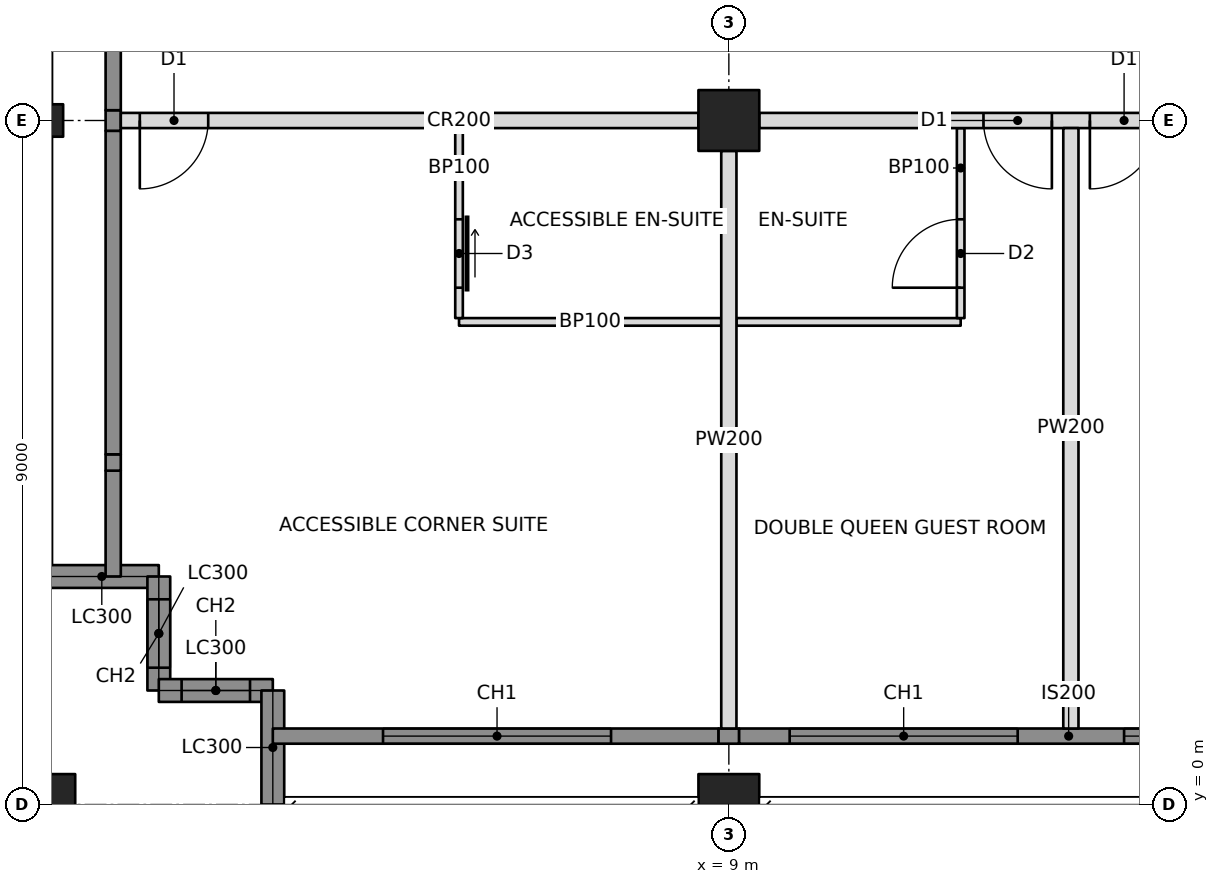
"""IFC4 building model, lengths in metres.
Left out: names, types, materials, properties, quantities, classifications, styles, units other than length and angle.
Written with IfcOpenShell. Run it as: python <this file> out.ifc"""

import sys

from ifc_helpers import new_model, si_unit, direction, frame, frame_2d, origin, origin_with_axes, origin_2d, place, context, subcontext, project, spatial, rectangle, hollow_rectangle, i_section, extrude, element, fill, save


model = new_model("IFC4")
c1 = context("Model", 3, precision=1e-05, world=origin(), true_north=direction((0.0, 1.0)))
c2 = subcontext(c1, "Body", "Model", "MODEL_VIEW")
j1 = project(units=[si_unit("LENGTHUNIT", "METRE"), si_unit("PLANEANGLEUNIT", "RADIAN")], contexts=[c1])
p1 = place(None, origin())
s1 = spatial("IfcSite", under=j1, at=p1, CompositionType="ELEMENT")
p2 = place(p1, origin())
s2 = spatial("IfcBuilding", under=s1, at=p2, CompositionType="ELEMENT")
p3 = place(p2, frame((0.0, 0.0, 204.6)))
s3 = spatial("IfcBuildingStorey", under=s2, at=p3, CompositionType="ELEMENT", Elevation=204.6)
p4 = place(p3, origin_with_axes())
e1 = element("IfcColumn", 1, at=p4, inside=s3, PredefinedType="COLUMN", context=c2, shape_type="SweptSolid", body=[
    extrude(hollow_rectangle(XDim=0.8, YDim=0.8, WallThickness=0.06, at=origin_2d()), origin(), (0.0, 0.0, 1.0), 3.4),
])
p5 = place(p3, frame((0.0, 9.0, 0.0), z_axis=(0.0, 0.0, 1.0), x_axis=(0.0, 1.0, 0.0)))
e2 = element("IfcColumn", 2, at=p5, inside=s3, PredefinedType="COLUMN", context=c2, shape_type="SweptSolid", body=[
    extrude(i_section(OverallWidth=0.427, OverallDepth=0.483, WebThickness=0.051, FlangeThickness=0.082, at=origin_2d()), origin(), (0.0, 0.0, 1.0), 3.4),
])
p6 = place(p3, frame((9.0, 0.0, 0.0), z_axis=(0.0, 0.0, 1.0), x_axis=(1.0, 0.0, 0.0)))
e3 = element("IfcColumn", 3, at=p6, inside=s3, PredefinedType="COLUMN", context=c2, shape_type="SweptSolid", body=[
    extrude(hollow_rectangle(XDim=0.8, YDim=0.8, WallThickness=0.06, at=origin_2d()), origin(), (0.0, 0.0, 1.0), 3.4),
])
p7 = place(p3, frame((9.0, 9.0, 0.0), z_axis=(0.0, 0.0, 1.0), x_axis=(1.0, 0.0, 0.0)))
e4 = element("IfcColumn", 4, at=p7, inside=s3, PredefinedType="COLUMN", context=c2, shape_type="SweptSolid", body=[
    extrude(hollow_rectangle(XDim=0.8, YDim=0.8, WallThickness=0.05, at=origin_2d()), origin(), (0.0, 0.0, 1.0), 3.4),
])
p8 = place(p3, frame((0.0, 3.0, 0.0), z_axis=(0.0, 0.0, 1.0), x_axis=(1.0, 0.0, 0.0)))
e5 = element("IfcWall", 5, at=p8, inside=s3, PredefinedType="SOLIDWALL", context=c2, shape_type="SweptSolid", body=[
    extrude(rectangle(XDim=1.5, YDim=0.3, at=frame_2d((0.75, 0.0))), origin(), (0.0, 0.0, 1.0), 2.42),
])
p9 = place(p3, frame((1.5, 3.0, 0.0), z_axis=(0.0, 0.0, 1.0), x_axis=(0.0, -1.0, 0.0)))
e6 = element("IfcWall", 6, at=p9, inside=s3, PredefinedType="SOLIDWALL", context=c2, shape_type="SweptSolid", body=[
    extrude(rectangle(XDim=1.5, YDim=0.3, at=frame_2d((0.75, 0.0))), origin(), (0.0, 0.0, 1.0), 3.2),
])
p10 = place(p9, frame((0.3, 0.0, 0.6)))
e7 = element("IfcOpeningElement", 7, at=p10, cuts=e6, PredefinedType="OPENING", context=c2, shape_type="SweptSolid", body=[
    extrude(rectangle(XDim=0.9, YDim=2.2, at=frame_2d((0.45, 1.1))), frame((0.0, 0.16, 0.0), z_axis=(0.0, -1.0, 0.0), x_axis=(1.0, 0.0, 0.0)), (0.0, 0.0, 1.0), 0.32),
])
p11 = place(p3, frame((1.5, 1.5, 0.0), z_axis=(0.0, 0.0, 1.0), x_axis=(1.0, 0.0, 0.0)))
e8 = element("IfcWall", 8, at=p11, inside=s3, PredefinedType="SOLIDWALL", context=c2, shape_type="SweptSolid", body=[
    extrude(rectangle(XDim=1.5, YDim=0.3, at=frame_2d((0.75, 0.0))), origin(), (0.0, 0.0, 1.0), 3.2),
])
p12 = place(p11, frame((0.3, 0.0, 0.6)))
e9 = element("IfcOpeningElement", 9, at=p12, cuts=e8, PredefinedType="OPENING", context=c2, shape_type="SweptSolid", body=[
    extrude(rectangle(XDim=0.9, YDim=2.2, at=frame_2d((0.45, 1.1))), frame((0.0, 0.16, 0.0), z_axis=(0.0, -1.0, 0.0), x_axis=(1.0, 0.0, 0.0)), (0.0, 0.0, 1.0), 0.32),
])
p13 = place(p3, frame((3.0, 1.5, 0.0), z_axis=(0.0, 0.0, 1.0), x_axis=(0.0, -1.0, 0.0)))
e10 = element("IfcWall", 10, at=p13, inside=s3, PredefinedType="SOLIDWALL", context=c2, shape_type="SweptSolid", body=[
    extrude(rectangle(XDim=1.5, YDim=0.3, at=frame_2d((0.75, 0.0))), origin(), (0.0, 0.0, 1.0), 2.42),
])
p14 = place(p3, frame((3.0, 0.9, 0.0), z_axis=(0.0, 0.0, 1.0), x_axis=(1.0, 0.0, 0.0)))
e11 = element("IfcWall", 11, at=p14, inside=s3, PredefinedType="SOLIDWALL", context=c2, shape_type="SweptSolid", body=[
    extrude(rectangle(XDim=5.865, YDim=0.2, at=frame_2d((2.932, 0.0))), origin(), (0.0, 0.0, 1.0), 3.2),
])
p15 = place(p14, frame((1.45, 0.0, 0.6)))
e12 = element("IfcOpeningElement", 12, at=p15, cuts=e11, PredefinedType="OPENING", context=c2, shape_type="SweptSolid", body=[
    extrude(rectangle(XDim=3.0, YDim=2.2, at=frame_2d((1.5, 1.1))), frame((0.0, 0.11, 0.0), z_axis=(0.0, -1.0, 0.0), x_axis=(1.0, 0.0, 0.0)), (0.0, 0.0, 1.0), 0.22),
])
p16 = place(p3, frame((0.9, 3.0, 0.0), z_axis=(0.0, 0.0, 1.0), x_axis=(0.0, 1.0, 0.0)))
e13 = element("IfcWall", 13, at=p16, inside=s3, PredefinedType="SOLIDWALL", context=c2, shape_type="SweptSolid", body=[
    extrude(rectangle(XDim=1.393, YDim=0.2, at=frame_2d((0.696, 0.0))), origin(), (0.0, 0.0, 1.0), 3.2),
])
p17 = place(p3, frame((1.0, 9.0, 0.0), z_axis=(0.0, 0.0, 1.0), x_axis=(1.0, 0.0, 0.0)))
e14 = element("IfcWall", 14, at=p17, inside=s3, PredefinedType="PARTITIONING", context=c2, shape_type="SweptSolid", body=[
    extrude(rectangle(XDim=7.6, YDim=0.2, at=frame_2d((3.8, 0.0))), origin(), (0.0, 0.0, 1.0), 2.438),
])
p18 = place(p17, frame((0.25, 0.0, 0.0)))
e15 = element("IfcOpeningElement", 15, at=p18, cuts=e14, PredefinedType="OPENING", context=c2, shape_type="SweptSolid", body=[
    extrude(rectangle(XDim=0.9, YDim=2.1, at=frame_2d((0.45, 1.05))), frame((0.0, 0.11, 0.0), z_axis=(0.0, -1.0, 0.0), x_axis=(1.0, 0.0, 0.0)), (0.0, 0.0, 1.0), 0.22),
])
p19 = place(p3, frame((9.4, 9.0, 0.0), z_axis=(0.0, 0.0, 1.0), x_axis=(1.0, 0.0, 0.0)))
e16 = element("IfcWall", 16, at=p19, inside=s3, PredefinedType="PARTITIONING", context=c2, shape_type="SweptSolid", body=[
    extrude(rectangle(XDim=8.2, YDim=0.2, at=frame_2d((4.1, 0.0))), origin(), (0.0, 0.0, 1.0), 2.405),
])
p20 = place(p19, frame((2.95, 0.0, 0.0)))
e17 = element("IfcOpeningElement", 17, at=p20, cuts=e16, PredefinedType="OPENING", context=c2, shape_type="SweptSolid", body=[
    extrude(rectangle(XDim=0.9, YDim=2.1, at=frame_2d((0.45, 1.05))), frame((0.0, 0.11, 0.0), z_axis=(0.0, -1.0, 0.0), x_axis=(1.0, 0.0, 0.0)), (0.0, 0.0, 1.0), 0.22),
])
p21 = place(p19, frame((4.35, 0.0, 0.0)))
e18 = element("IfcOpeningElement", 18, at=p21, cuts=e16, PredefinedType="OPENING", context=c2, shape_type="SweptSolid", body=[
    extrude(rectangle(XDim=0.9, YDim=2.1, at=frame_2d((0.45, 1.05))), frame((0.0, 0.11, 0.0), z_axis=(0.0, -1.0, 0.0), x_axis=(1.0, 0.0, 0.0)), (0.0, 0.0, 1.0), 0.22),
])
p22 = place(p3, frame((9.0, 8.6, 0.0), z_axis=(0.0, 0.0, 1.0), x_axis=(0.0, -1.0, 0.0)))
e19 = element("IfcWall", 19, at=p22, inside=s3, PredefinedType="PARTITIONING", context=c2, shape_type="SweptSolid", body=[
    extrude(rectangle(XDim=7.6, YDim=0.2, at=frame_2d((3.8, 0.0))), origin(), (0.0, 0.0, 1.0), 2.438),
])
p23 = place(p3, frame((13.5, 8.9, 0.0), z_axis=(0.0, 0.0, 1.0), x_axis=(0.0, -1.0, 0.0)))
e20 = element("IfcWall", 20, at=p23, inside=s3, PredefinedType="PARTITIONING", context=c2, shape_type="SweptSolid", body=[
    extrude(rectangle(XDim=7.9, YDim=0.2, at=frame_2d((3.95, 0.0))), origin(), (0.0, 0.0, 1.0), 2.404),
])
p24 = place(p3, frame((5.45, 6.35, 0.0), z_axis=(0.0, 0.0, 1.0), x_axis=(1.0, 0.0, 0.0)))
e21 = element("IfcWall", 21, at=p24, inside=s3, PredefinedType="PARTITIONING", context=c2, shape_type="SweptSolid", body=[
    extrude(rectangle(XDim=3.45, YDim=0.1, at=frame_2d((1.725, 0.0))), origin(), (0.0, 0.0, 1.0), 2.438),
])
p25 = place(p3, frame((5.45, 8.9, 0.0), z_axis=(0.0, 0.0, 1.0), x_axis=(0.0, -1.0, 0.0)))
e22 = element("IfcWall", 22, at=p25, inside=s3, PredefinedType="PARTITIONING", context=c2, shape_type="SweptSolid", body=[
    extrude(rectangle(XDim=2.5, YDim=0.1, at=frame_2d((1.25, 0.0))), origin(), (0.0, 0.0, 1.0), 2.438),
])
p26 = place(p25, frame((1.2, 0.0, 0.0)))
e23 = element("IfcOpeningElement", 23, at=p26, cuts=e22, PredefinedType="OPENING", context=c2, shape_type="SweptSolid", body=[
    extrude(rectangle(XDim=0.9, YDim=2.1, at=frame_2d((0.45, 1.05))), frame((0.0, 0.06, 0.0), z_axis=(0.0, -1.0, 0.0), x_axis=(1.0, 0.0, 0.0)), (0.0, 0.0, 1.0), 0.12),
])
p27 = place(p3, frame((9.1, 6.35, 0.0), z_axis=(0.0, 0.0, 1.0), x_axis=(1.0, 0.0, 0.0)))
e24 = element("IfcWall", 24, at=p27, inside=s3, PredefinedType="PARTITIONING", context=c2, shape_type="SweptSolid", body=[
    extrude(rectangle(XDim=2.95, YDim=0.1, at=frame_2d((1.475, 0.0))), origin(), (0.0, 0.0, 1.0), 2.438),
])
p28 = place(p3, frame((12.05, 8.9, 0.0), z_axis=(0.0, 0.0, 1.0), x_axis=(0.0, -1.0, 0.0)))
e25 = element("IfcWall", 25, at=p28, inside=s3, PredefinedType="PARTITIONING", context=c2, shape_type="SweptSolid", body=[
    extrude(rectangle(XDim=2.5, YDim=0.1, at=frame_2d((1.25, 0.0))), origin(), (0.0, 0.0, 1.0), 2.404),
])
p29 = place(p28, frame((1.2, 0.0, 0.0)))
e26 = element("IfcOpeningElement", 26, at=p29, cuts=e25, PredefinedType="OPENING", context=c2, shape_type="SweptSolid", body=[
    extrude(rectangle(XDim=0.9, YDim=2.1, at=frame_2d((0.45, 1.05))), frame((0.0, 0.06, 0.0), z_axis=(0.0, -1.0, 0.0), x_axis=(1.0, 0.0, 0.0)), (0.0, 0.0, 1.0), 0.12),
])
p30 = place(p3, frame((8.865, 0.9, 0.0), z_axis=(0.0, 0.0, 1.0), x_axis=(1.0, 0.0, 0.0)))
e27 = element("IfcWall", 27, at=p30, inside=s3, PredefinedType="SOLIDWALL", context=c2, shape_type="SweptSolid", body=[
    extrude(rectangle(XDim=0.271, YDim=0.2, at=frame_2d((0.135, 0.0))), origin(), (0.0, 0.0, 1.0), 2.438),
])
p31 = place(p3, frame((9.135, 0.9, 0.0), z_axis=(0.0, 0.0, 1.0), x_axis=(1.0, 0.0, 0.0)))
e28 = element("IfcWall", 28, at=p31, inside=s3, PredefinedType="SOLIDWALL", context=c2, shape_type="SweptSolid", body=[
    extrude(rectangle(XDim=8.671, YDim=0.2, at=frame_2d((4.335, 0.0))), origin(), (0.0, 0.0, 1.0), 3.2),
])
p32 = place(p31, frame((0.665, 0.0, 0.6)))
e29 = element("IfcOpeningElement", 29, at=p32, cuts=e28, PredefinedType="OPENING", context=c2, shape_type="SweptSolid", body=[
    extrude(rectangle(XDim=3.0, YDim=2.2, at=frame_2d((1.5, 1.1))), frame((0.0, 0.11, 0.0), z_axis=(0.0, -1.0, 0.0), x_axis=(1.0, 0.0, 0.0)), (0.0, 0.0, 1.0), 0.22),
])
p33 = place(p31, frame((5.065, 0.0, 0.6)))
e30 = element("IfcOpeningElement", 30, at=p33, cuts=e28, PredefinedType="OPENING", context=c2, shape_type="SweptSolid", body=[
    extrude(rectangle(XDim=3.0, YDim=2.2, at=frame_2d((1.5, 1.1))), frame((0.0, 0.11, 0.0), z_axis=(0.0, -1.0, 0.0), x_axis=(1.0, 0.0, 0.0)), (0.0, 0.0, 1.0), 0.22),
])
p34 = place(p3, frame((0.9, 4.393, 0.0), z_axis=(0.0, 0.0, 1.0), x_axis=(0.0, 1.0, 0.0)))
e31 = element("IfcWall", 31, at=p34, inside=s3, PredefinedType="SOLIDWALL", context=c2, shape_type="SweptSolid", body=[
    extrude(rectangle(XDim=0.215, YDim=0.2, at=frame_2d((0.107, 0.0))), origin(), (0.0, 0.0, 1.0), 2.661),
])
p35 = place(p3, frame((0.9, 4.607, 0.0), z_axis=(0.0, 0.0, 1.0), x_axis=(0.0, 1.0, 0.0)))
e32 = element("IfcWall", 32, at=p35, inside=s3, PredefinedType="SOLIDWALL", context=c2, shape_type="SweptSolid", body=[
    extrude(rectangle(XDim=4.257, YDim=0.2, at=frame_2d((2.129, 0.0))), origin(), (0.0, 0.0, 1.0), 3.2),
])
p36 = place(p3, frame((0.9, 8.865, 0.0), z_axis=(0.0, 0.0, 1.0), x_axis=(0.0, 1.0, 0.0)))
e33 = element("IfcWall", 33, at=p36, inside=s3, PredefinedType="SOLIDWALL", context=c2, shape_type="SweptSolid", body=[
    extrude(rectangle(XDim=0.271, YDim=0.2, at=frame_2d((0.135, 0.0))), origin(), (0.0, 0.0, 1.0), 2.438),
])
p37 = place(p3, frame((0.9, 9.135, 0.0), z_axis=(0.0, 0.0, 1.0), x_axis=(0.0, 1.0, 0.0)))
e34 = element("IfcWall", 34, at=p37, inside=s3, PredefinedType="SOLIDWALL", context=c2, shape_type="SweptSolid", body=[
    extrude(rectangle(XDim=8.671, YDim=0.2, at=frame_2d((4.335, 0.0))), origin(), (0.0, 0.0, 1.0), 3.2),
])
p38 = place(p37, frame((2.015, 0.0, 0.6)))
e35 = element("IfcOpeningElement", 35, at=p38, cuts=e34, PredefinedType="OPENING", context=c2, shape_type="SweptSolid", body=[
    extrude(rectangle(XDim=3.0, YDim=2.2, at=frame_2d((1.5, 1.1))), frame((0.0, 0.11, 0.0), z_axis=(0.0, -1.0, 0.0), x_axis=(1.0, 0.0, 0.0)), (0.0, 0.0, 1.0), 0.22),
])
p39 = place(p37, frame((5.515, 0.0, 0.6)))
e36 = element("IfcOpeningElement", 36, at=p39, cuts=e34, PredefinedType="OPENING", context=c2, shape_type="SweptSolid", body=[
    extrude(rectangle(XDim=3.0, YDim=2.2, at=frame_2d((1.5, 1.1))), frame((0.0, 0.11, 0.0), z_axis=(0.0, -1.0, 0.0), x_axis=(1.0, 0.0, 0.0)), (0.0, 0.0, 1.0), 0.22),
])
p40 = place(p10, origin())
e37 = element("IfcWindow", 37, at=p40, inside=s3, PartitioningType="SINGLE_PANEL", PredefinedType="WINDOW", context=c2, shape_type="SweptSolid", body=[
    extrude(rectangle(XDim=0.9, YDim=2.2, at=frame_2d((0.45, 1.1))), frame((0.0, 0.03, 0.0), z_axis=(0.0, -1.0, 0.0), x_axis=(1.0, 0.0, 0.0)), (0.0, 0.0, 1.0), 0.06),
])
fill(e7, e37)
p41 = place(p12, origin())
e38 = element("IfcWindow", 38, at=p41, inside=s3, PartitioningType="SINGLE_PANEL", PredefinedType="WINDOW", context=c2, shape_type="SweptSolid", body=[
    extrude(rectangle(XDim=0.9, YDim=2.2, at=frame_2d((0.45, 1.1))), frame((0.0, 0.03, 0.0), z_axis=(0.0, -1.0, 0.0), x_axis=(1.0, 0.0, 0.0)), (0.0, 0.0, 1.0), 0.06),
])
fill(e9, e38)
p42 = place(p15, origin())
e39 = element("IfcWindow", 39, at=p42, inside=s3, PartitioningType="TRIPLE_PANEL_VERTICAL", PredefinedType="WINDOW", context=c2, shape_type="SweptSolid", body=[
    extrude(rectangle(XDim=3.0, YDim=2.2, at=frame_2d((1.5, 1.1))), frame((0.0, 0.03, 0.0), z_axis=(0.0, -1.0, 0.0), x_axis=(1.0, 0.0, 0.0)), (0.0, 0.0, 1.0), 0.06),
])
fill(e12, e39)
p43 = place(p32, origin())
e40 = element("IfcWindow", 40, at=p43, inside=s3, PartitioningType="TRIPLE_PANEL_VERTICAL", PredefinedType="WINDOW", context=c2, shape_type="SweptSolid", body=[
    extrude(rectangle(XDim=3.0, YDim=2.2, at=frame_2d((1.5, 1.1))), frame((0.0, 0.03, 0.0), z_axis=(0.0, -1.0, 0.0), x_axis=(1.0, 0.0, 0.0)), (0.0, 0.0, 1.0), 0.06),
])
fill(e29, e40)
p44 = place(p33, origin())
e41 = element("IfcWindow", 41, at=p44, inside=s3, PartitioningType="TRIPLE_PANEL_VERTICAL", PredefinedType="WINDOW", context=c2, shape_type="SweptSolid", body=[
    extrude(rectangle(XDim=3.0, YDim=2.2, at=frame_2d((1.5, 1.1))), frame((0.0, 0.03, 0.0), z_axis=(0.0, -1.0, 0.0), x_axis=(1.0, 0.0, 0.0)), (0.0, 0.0, 1.0), 0.06),
])
fill(e30, e41)
p45 = place(p26, origin())
e42 = element("IfcDoor", 42, at=p45, inside=s3, OperationType="SLIDING_TO_LEFT", PredefinedType="DOOR", context=c2, shape_type="SweptSolid", body=[
    extrude(rectangle(XDim=0.9, YDim=2.1, at=frame_2d((0.45, 1.05))), frame((0.0, 0.025, 0.0), z_axis=(0.0, -1.0, 0.0), x_axis=(1.0, 0.0, 0.0)), (0.0, 0.0, 1.0), 0.05),
])
fill(e23, e42)
p46 = place(p18, frame((0.9, 0.0, 0.0), z_axis=(0.0, 0.0, 1.0), x_axis=(-1.0, 0.0, 0.0)))
e43 = element("IfcDoor", 43, at=p46, inside=s3, OperationType="SINGLE_SWING_RIGHT", PredefinedType="DOOR", context=c2, shape_type="SweptSolid", body=[
    extrude(rectangle(XDim=0.9, YDim=2.1, at=frame_2d((0.45, 1.05))), frame((0.0, 0.025, 0.0), z_axis=(0.0, -1.0, 0.0), x_axis=(1.0, 0.0, 0.0)), (0.0, 0.0, 1.0), 0.05),
])
fill(e15, e43)
p47 = place(p29, frame((0.9, 0.0, 0.0), z_axis=(0.0, 0.0, 1.0), x_axis=(-1.0, 0.0, 0.0)))
e44 = element("IfcDoor", 44, at=p47, inside=s3, OperationType="SINGLE_SWING_LEFT", PredefinedType="DOOR", context=c2, shape_type="SweptSolid", body=[
    extrude(rectangle(XDim=0.9, YDim=2.1, at=frame_2d((0.45, 1.05))), frame((0.0, 0.025, 0.0), z_axis=(0.0, -1.0, 0.0), x_axis=(1.0, 0.0, 0.0)), (0.0, 0.0, 1.0), 0.05),
])
fill(e26, e44)
p48 = place(p20, frame((0.9, 0.0, 0.0), z_axis=(0.0, 0.0, 1.0), x_axis=(-1.0, 0.0, 0.0)))
e45 = element("IfcDoor", 45, at=p48, inside=s3, OperationType="SINGLE_SWING_LEFT", PredefinedType="DOOR", context=c2, shape_type="SweptSolid", body=[
    extrude(rectangle(XDim=0.9, YDim=2.1, at=frame_2d((0.45, 1.05))), frame((0.0, 0.025, 0.0), z_axis=(0.0, -1.0, 0.0), x_axis=(1.0, 0.0, 0.0)), (0.0, 0.0, 1.0), 0.05),
])
fill(e17, e45)
p49 = place(p21, frame((0.9, 0.0, 0.0), z_axis=(0.0, 0.0, 1.0), x_axis=(-1.0, 0.0, 0.0)))
e46 = element("IfcDoor", 46, at=p49, inside=s3, OperationType="SINGLE_SWING_RIGHT", PredefinedType="DOOR", context=c2, shape_type="SweptSolid", body=[
    extrude(rectangle(XDim=0.9, YDim=2.1, at=frame_2d((0.45, 1.05))), frame((0.0, 0.025, 0.0), z_axis=(0.0, -1.0, 0.0), x_axis=(1.0, 0.0, 0.0)), (0.0, 0.0, 1.0), 0.05),
])
fill(e18, e46)
save(model, sys.argv[1])
